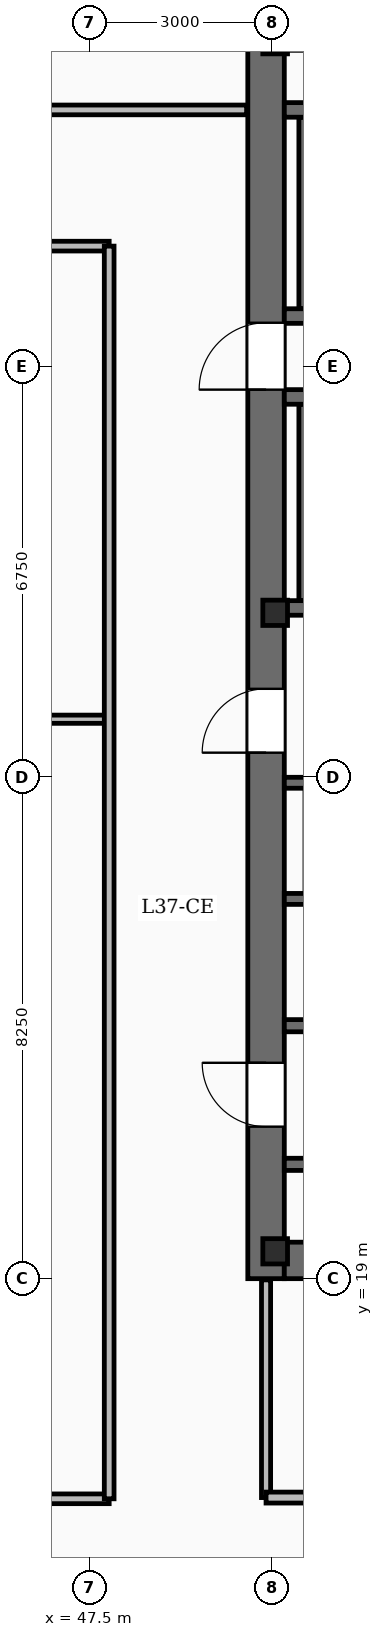
"""IFC4 building model, lengths in metres.
Left out: names, types, materials, properties, quantities, classifications, styles, units other than length and angle.
Written with IfcOpenShell. Run it as: python <this file> out.ifc"""

import sys

from ifc_helpers import new_model, si_unit, direction, frame, frame_2d, origin, origin_2d, place, context, subcontext, project, spatial, rectangle, i_section, extrude, element, fill, save


model = new_model("IFC4")
c1 = context("Model", 3, precision=1e-05, world=origin(), true_north=direction((0.0, 1.0)))
c2 = subcontext(c1, "Body", "Model", "MODEL_VIEW")
j1 = project(units=[si_unit("LENGTHUNIT", "METRE"), si_unit("PLANEANGLEUNIT", "RADIAN")], contexts=[c1])
p1 = place(None, origin())
s1 = spatial("IfcSite", under=j1, at=p1, CompositionType="ELEMENT")
p2 = place(p1, origin())
s2 = spatial("IfcBuilding", under=s1, at=p2, CompositionType="ELEMENT")
p3 = place(p2, frame((0.0, 0.0, 158.45)))
s3 = spatial("IfcBuildingStorey", under=s2, at=p3, CompositionType="ELEMENT", Elevation=158.45)
p4 = place(p3, frame((50.4, 19.0, -0.45), z_axis=(0.0, 0.0, 1.0), x_axis=(0.0, 1.0, 0.0)))
e1 = element("IfcWall", 1, at=p4, inside=s3, PredefinedType="SHEAR", context=c2, shape_type="SweptSolid", body=[
    extrude(rectangle(XDim=20.8, YDim=0.6, at=frame_2d((10.4, 0.0))), origin(), (0.0, 0.0, 1.0), 3.93),
])
p5 = place(p4, frame((2.5, 0.0, 0.45)))
e2 = element("IfcOpeningElement", 2, at=p5, cuts=e1, PredefinedType="OPENING", context=c2, shape_type="SweptSolid", body=[
    extrude(rectangle(XDim=1.05, YDim=2.15, at=frame_2d((0.525, 1.075))), frame((0.0, 0.31, 0.0), z_axis=(0.0, -1.0, 0.0), x_axis=(1.0, 0.0, 0.0)), (0.0, 0.0, 1.0), 0.62),
])
p6 = place(p4, frame((8.65, 0.0, 0.45)))
e3 = element("IfcOpeningElement", 3, at=p6, cuts=e1, PredefinedType="OPENING", context=c2, shape_type="SweptSolid", body=[
    extrude(rectangle(XDim=1.05, YDim=2.15, at=frame_2d((0.525, 1.075))), frame((0.0, 0.31, 0.0), z_axis=(0.0, -1.0, 0.0), x_axis=(1.0, 0.0, 0.0)), (0.0, 0.0, 1.0), 0.62),
])
p7 = place(p4, frame((14.62, 0.0, 0.45)))
e4 = element("IfcOpeningElement", 4, at=p7, cuts=e1, PredefinedType="OPENING", context=c2, shape_type="SweptSolid", body=[
    extrude(rectangle(XDim=1.1, YDim=2.15, at=frame_2d((0.55, 1.075))), frame((0.0, 0.31, 0.0), z_axis=(0.0, -1.0, 0.0), x_axis=(1.0, 0.0, 0.0)), (0.0, 0.0, 1.0), 0.62),
])
p8 = place(p3, frame((50.7, 19.3, -0.45), z_axis=(0.0, 0.0, 1.0), x_axis=(1.0, 0.0, 0.0)))
e5 = element("IfcWall", 5, at=p8, inside=s3, PredefinedType="SHEAR", context=c2, shape_type="SweptSolid", body=[
    extrude(rectangle(XDim=9.5, YDim=0.6, at=frame_2d((4.75, 0.0))), origin(), (0.0, 0.0, 1.0), 3.93),
])
for number, where, z_axis, x_axis in (
    (6, (50.55, 19.45, -0.45), (0.0, 0.0, 1.0), (1.0, 0.0, 0.0)),
    (7, (50.55, 29.95, -0.45), (0.0, 0.0, 1.0), (1.0, 0.0, 0.0)),
    (8, (50.55, 39.35, -0.45), (0.0, 0.0, 1.0), (1.0, 0.0, 0.0)),
):
    element("IfcColumn", number, at=place(p3, frame(where, z_axis=z_axis, x_axis=x_axis)), inside=s3, PredefinedType="COLUMN", context=c2, shape_type="SweptSolid", body=[
        extrude(i_section(OverallWidth=0.406, OverallDepth=0.416, WebThickness=0.03, FlangeThickness=0.048, FilletRadius=0.02, at=origin_2d()), origin(), (0.0, 0.0, 1.0), 3.93),
    ])
p9 = place(p3, frame((60.2, 30.03, 0.0), z_axis=(0.0, 0.0, 1.0), x_axis=(-1.0, 0.0, 0.0)))
e9 = element("IfcWall", 9, at=p9, inside=s3, PredefinedType="SOLIDWALL", context=c2, shape_type="SweptSolid", body=[
    extrude(rectangle(XDim=9.5, YDim=0.24, at=frame_2d((4.75, 0.0))), origin(), (0.0, 0.0, 1.0), 3.48),
])
p10 = place(p9, frame((7.68, 0.0, 0.0)))
e10 = element("IfcOpeningElement", 10, at=p10, cuts=e9, PredefinedType="OPENING", context=c2, shape_type="SweptSolid", body=[
    extrude(rectangle(XDim=1.1, YDim=2.15, at=frame_2d((0.55, 1.075))), frame((0.0, 0.13, 0.0), z_axis=(0.0, -1.0, 0.0), x_axis=(1.0, 0.0, 0.0)), (0.0, 0.0, 1.0), 0.26),
])
p11 = place(p3, frame((50.7, 33.5, 0.0), z_axis=(0.0, 0.0, 1.0), x_axis=(1.0, 0.0, 0.0)))
e11 = element("IfcWall", 11, at=p11, inside=s3, PredefinedType="SOLIDWALL", context=c2, shape_type="SweptSolid", body=[
    extrude(rectangle(XDim=9.5, YDim=0.24, at=frame_2d((4.75, 0.0))), origin(), (0.0, 0.0, 1.0), 3.48),
])
p12 = place(p3, frame((51.06, 30.15, 0.0), z_axis=(0.0, 0.0, 1.0), x_axis=(0.0, 1.0, 0.0)))
e12 = element("IfcWall", 12, at=p12, inside=s3, PredefinedType="SOLIDWALL", context=c2, shape_type="SweptSolid", body=[
    extrude(rectangle(XDim=3.23, YDim=0.24, at=frame_2d((1.615, 0.0))), origin(), (0.0, 0.0, 1.0), 3.48),
])
p13 = place(p3, frame((60.2, 34.83, 0.0), z_axis=(0.0, 0.0, 1.0), x_axis=(-1.0, 0.0, 0.0)))
e13 = element("IfcWall", 13, at=p13, inside=s3, PredefinedType="SOLIDWALL", context=c2, shape_type="SweptSolid", body=[
    extrude(rectangle(XDim=9.5, YDim=0.24, at=frame_2d((4.75, 0.0))), origin(), (0.0, 0.0, 1.0), 3.48),
])
p14 = place(p13, frame((7.72, 0.0, 0.0)))
e14 = element("IfcOpeningElement", 14, at=p14, cuts=e13, PredefinedType="OPENING", context=c2, shape_type="SweptSolid", body=[
    extrude(rectangle(XDim=1.1, YDim=2.15, at=frame_2d((0.55, 1.075))), frame((0.0, 0.13, 0.0), z_axis=(0.0, -1.0, 0.0), x_axis=(1.0, 0.0, 0.0)), (0.0, 0.0, 1.0), 0.26),
])
p15 = place(p3, frame((50.7, 38.22, 0.0), z_axis=(0.0, 0.0, 1.0), x_axis=(1.0, 0.0, 0.0)))
e15 = element("IfcWall", 15, at=p15, inside=s3, PredefinedType="SOLIDWALL", context=c2, shape_type="SweptSolid", body=[
    extrude(rectangle(XDim=9.5, YDim=0.24, at=frame_2d((4.75, 0.0))), origin(), (0.0, 0.0, 1.0), 3.48),
])
p16 = place(p3, frame((51.06, 34.95, 0.0), z_axis=(0.0, 0.0, 1.0), x_axis=(0.0, 1.0, 0.0)))
e16 = element("IfcWall", 16, at=p16, inside=s3, PredefinedType="SOLIDWALL", context=c2, shape_type="SweptSolid", body=[
    extrude(rectangle(XDim=3.15, YDim=0.24, at=frame_2d((1.575, 0.0))), origin(), (0.0, 0.0, 1.0), 3.48),
])
p17 = place(p3, frame((50.7, 27.155, 0.0), z_axis=(0.0, 0.0, 1.0), x_axis=(1.0, 0.0, 0.0)))
e17 = element("IfcWall", 17, at=p17, inside=s3, PredefinedType="SOLIDWALL", context=c2, shape_type="SweptSolid", body=[
    extrude(rectangle(XDim=3.165, YDim=0.18, at=frame_2d((1.583, 0.0))), origin(), (0.0, 0.0, 1.0), 3.48),
])
p18 = place(p17, frame((1.085, 0.0, 0.0)))
e18 = element("IfcOpeningElement", 18, at=p18, cuts=e17, PredefinedType="OPENING", context=c2, shape_type="SweptSolid", body=[
    extrude(rectangle(XDim=1.35, YDim=2.3, at=frame_2d((0.675, 1.15))), frame((0.0, 0.1, 0.0), z_axis=(0.0, -1.0, 0.0), x_axis=(1.0, 0.0, 0.0)), (0.0, 0.0, 1.0), 0.2),
])
p19 = place(p3, frame((50.7, 25.245, 0.0), z_axis=(0.0, 0.0, 1.0), x_axis=(1.0, 0.0, 0.0)))
e19 = element("IfcWall", 19, at=p19, inside=s3, PredefinedType="SOLIDWALL", context=c2, shape_type="SweptSolid", body=[
    extrude(rectangle(XDim=3.165, YDim=0.18, at=frame_2d((1.583, 0.0))), origin(), (0.0, 0.0, 1.0), 3.48),
])
p20 = place(p3, frame((50.7, 20.88, 0.0), z_axis=(0.0, 0.0, 1.0), x_axis=(1.0, 0.0, 0.0)))
e20 = element("IfcWall", 20, at=p20, inside=s3, PredefinedType="SOLIDWALL", context=c2, shape_type="SweptSolid", body=[
    extrude(rectangle(XDim=9.5, YDim=0.2, at=frame_2d((4.75, 0.0))), origin(), (0.0, 0.0, 1.0), 2.54),
])
p21 = place(p20, frame((1.4, 0.0, 0.0)))
e21 = element("IfcOpeningElement", 21, at=p21, cuts=e20, PredefinedType="OPENING", context=c2, shape_type="SweptSolid", body=[
    extrude(rectangle(XDim=1.05, YDim=2.15, at=frame_2d((0.525, 1.075))), frame((0.0, 0.11, 0.0), z_axis=(0.0, -1.0, 0.0), x_axis=(1.0, 0.0, 0.0)), (0.0, 0.0, 1.0), 0.22),
])
p22 = place(p20, frame((5.5, 0.0, 0.0)))
e22 = element("IfcOpeningElement", 22, at=p22, cuts=e20, PredefinedType="OPENING", context=c2, shape_type="SweptSolid", body=[
    extrude(rectangle(XDim=1.05, YDim=2.15, at=frame_2d((0.525, 1.075))), frame((0.0, 0.11, 0.0), z_axis=(0.0, -1.0, 0.0), x_axis=(1.0, 0.0, 0.0)), (0.0, 0.0, 1.0), 0.22),
])
p23 = place(p3, frame((50.7, 23.16, 0.0), z_axis=(0.0, 0.0, 1.0), x_axis=(1.0, 0.0, 0.0)))
e23 = element("IfcWall", 23, at=p23, inside=s3, PredefinedType="SOLIDWALL", context=c2, shape_type="SweptSolid", body=[
    extrude(rectangle(XDim=3.18, YDim=0.2, at=frame_2d((1.59, 0.0))), origin(), (0.0, 0.0, 1.0), 2.54),
])
p24 = place(p23, frame((0.55, 0.0, 0.0)))
e24 = element("IfcOpeningElement", 24, at=p24, cuts=e23, PredefinedType="OPENING", context=c2, shape_type="SweptSolid", body=[
    extrude(rectangle(XDim=0.86, YDim=2.05, at=frame_2d((0.43, 1.025))), frame((0.0, 0.11, 0.0), z_axis=(0.0, -1.0, 0.0), x_axis=(1.0, 0.0, 0.0)), (0.0, 0.0, 1.0), 0.22),
])
p25 = place(p3, frame((50.4, 15.4, 0.0), z_axis=(0.0, 0.0, 1.0), x_axis=(1.0, 0.0, 0.0)))
e25 = element("IfcWall", 25, at=p25, inside=s3, PredefinedType="SOLIDWALL", context=c2, shape_type="SweptSolid", body=[
    extrude(rectangle(XDim=10.0, YDim=0.18, at=frame_2d((5.0, 0.0))), origin(), (0.0, 0.0, 1.0), 2.54),
])
p26 = place(p25, frame((1.19, 0.0, 0.0)))
e26 = element("IfcOpeningElement", 26, at=p26, cuts=e25, PredefinedType="OPENING", context=c2, shape_type="SweptSolid", body=[
    extrude(rectangle(XDim=0.92, YDim=2.1, at=frame_2d((0.46, 1.05))), frame((0.0, 0.1, 0.0), z_axis=(0.0, -1.0, 0.0), x_axis=(1.0, 0.0, 0.0)), (0.0, 0.0, 1.0), 0.2),
])
p27 = place(p25, frame((4.54, 0.0, 0.0)))
e27 = element("IfcOpeningElement", 27, at=p27, cuts=e25, PredefinedType="OPENING", context=c2, shape_type="SweptSolid", body=[
    extrude(rectangle(XDim=0.92, YDim=2.1, at=frame_2d((0.46, 1.05))), frame((0.0, 0.1, 0.0), z_axis=(0.0, -1.0, 0.0), x_axis=(1.0, 0.0, 0.0)), (0.0, 0.0, 1.0), 0.2),
])
p28 = place(p25, frame((7.92, 0.0, 0.0)))
e28 = element("IfcOpeningElement", 28, at=p28, cuts=e25, PredefinedType="OPENING", context=c2, shape_type="SweptSolid", body=[
    extrude(rectangle(XDim=0.86, YDim=2.05, at=frame_2d((0.43, 1.025))), frame((0.0, 0.1, 0.0), z_axis=(0.0, -1.0, 0.0), x_axis=(1.0, 0.0, 0.0)), (0.0, 0.0, 1.0), 0.2),
])
p29 = place(p3, frame((50.4, 15.4, 0.0), z_axis=(0.0, 0.0, 1.0), x_axis=(0.0, 1.0, 0.0)))
e29 = element("IfcWall", 29, at=p29, inside=s3, PredefinedType="PARTITIONING", context=c2, shape_type="SweptSolid", body=[
    extrude(rectangle(XDim=3.58, YDim=0.15, at=frame_2d((1.79, 0.0))), origin(), (0.0, 0.0, 1.0), 2.54),
])
p30 = place(p3, frame((24.82, 38.22, 0.0), z_axis=(0.0, 0.0, 1.0), x_axis=(1.0, 0.0, 0.0)))
e30 = element("IfcWall", 30, at=p30, inside=s3, PredefinedType="PARTITIONING", context=c2, shape_type="SweptSolid", body=[
    extrude(rectangle(XDim=25.26, YDim=0.16, at=frame_2d((12.63, 0.0))), origin(), (0.0, 0.0, 1.0), 2.54),
])
p31 = place(p30, frame((3.38, 0.0, 0.0)))
e31 = element("IfcOpeningElement", 31, at=p31, cuts=e30, PredefinedType="OPENING", context=c2, shape_type="SweptSolid", body=[
    extrude(rectangle(XDim=0.95, YDim=2.15, at=frame_2d((0.475, 1.075))), frame((0.0, 0.09, 0.0), z_axis=(0.0, -1.0, 0.0), x_axis=(1.0, 0.0, 0.0)), (0.0, 0.0, 1.0), 0.18),
])
p32 = place(p30, frame((12.205, 0.0, 0.0)))
e32 = element("IfcOpeningElement", 32, at=p32, cuts=e30, PredefinedType="OPENING", context=c2, shape_type="SweptSolid", body=[
    extrude(rectangle(XDim=0.95, YDim=2.15, at=frame_2d((0.475, 1.075))), frame((0.0, 0.09, 0.0), z_axis=(0.0, -1.0, 0.0), x_axis=(1.0, 0.0, 0.0)), (0.0, 0.0, 1.0), 0.18),
])
p33 = place(p30, frame((20.98, 0.0, 0.0)))
e33 = element("IfcOpeningElement", 33, at=p33, cuts=e30, PredefinedType="OPENING", context=c2, shape_type="SweptSolid", body=[
    extrude(rectangle(XDim=0.95, YDim=2.15, at=frame_2d((0.475, 1.075))), frame((0.0, 0.09, 0.0), z_axis=(0.0, -1.0, 0.0), x_axis=(1.0, 0.0, 0.0)), (0.0, 0.0, 1.0), 0.18),
])
p34 = place(p3, frame((27.08, 28.2, 0.0), z_axis=(0.0, 0.0, 1.0), x_axis=(1.0, 0.0, 0.0)))
e34 = element("IfcWall", 34, at=p34, inside=s3, PredefinedType="PARTITIONING", context=c2, shape_type="SweptSolid", body=[
    extrude(rectangle(XDim=20.74, YDim=0.135, at=frame_2d((10.37, 0.0))), origin(), (0.0, 0.0, 1.0), 2.54),
])
p35 = place(p3, frame((27.08, 35.98, 0.0), z_axis=(0.0, 0.0, 1.0), x_axis=(1.0, 0.0, 0.0)))
e35 = element("IfcWall", 35, at=p35, inside=s3, PredefinedType="PARTITIONING", context=c2, shape_type="SweptSolid", body=[
    extrude(rectangle(XDim=20.74, YDim=0.16, at=frame_2d((10.37, 0.0))), origin(), (0.0, 0.0, 1.0), 2.54),
])
p36 = place(p35, frame((1.245, 0.0, 0.0)))
e36 = element("IfcOpeningElement", 36, at=p36, cuts=e35, PredefinedType="OPENING", context=c2, shape_type="SweptSolid", body=[
    extrude(rectangle(XDim=0.95, YDim=2.15, at=frame_2d((0.475, 1.075))), frame((0.0, 0.09, 0.0), z_axis=(0.0, -1.0, 0.0), x_axis=(1.0, 0.0, 0.0)), (0.0, 0.0, 1.0), 0.18),
])
p37 = place(p35, frame((6.445, 0.0, 0.0)))
e37 = element("IfcOpeningElement", 37, at=p37, cuts=e35, PredefinedType="OPENING", context=c2, shape_type="SweptSolid", body=[
    extrude(rectangle(XDim=0.95, YDim=2.15, at=frame_2d((0.475, 1.075))), frame((0.0, 0.09, 0.0), z_axis=(0.0, -1.0, 0.0), x_axis=(1.0, 0.0, 0.0)), (0.0, 0.0, 1.0), 0.18),
])
p38 = place(p35, frame((13.195, 0.0, 0.0)))
e38 = element("IfcOpeningElement", 38, at=p38, cuts=e35, PredefinedType="OPENING", context=c2, shape_type="SweptSolid", body=[
    extrude(rectangle(XDim=0.95, YDim=2.15, at=frame_2d((0.475, 1.075))), frame((0.0, 0.09, 0.0), z_axis=(0.0, -1.0, 0.0), x_axis=(1.0, 0.0, 0.0)), (0.0, 0.0, 1.0), 0.18),
])
p39 = place(p35, frame((18.345, 0.0, 0.0)))
e39 = element("IfcOpeningElement", 39, at=p39, cuts=e35, PredefinedType="OPENING", context=c2, shape_type="SweptSolid", body=[
    extrude(rectangle(XDim=0.95, YDim=2.15, at=frame_2d((0.475, 1.075))), frame((0.0, 0.09, 0.0), z_axis=(0.0, -1.0, 0.0), x_axis=(1.0, 0.0, 0.0)), (0.0, 0.0, 1.0), 0.18),
])
p40 = place(p3, frame((27.08, 15.38, 0.0), z_axis=(0.0, 0.0, 1.0), x_axis=(1.0, 0.0, 0.0)))
e40 = element("IfcWall", 40, at=p40, inside=s3, PredefinedType="PARTITIONING", context=c2, shape_type="SweptSolid", body=[
    extrude(rectangle(XDim=20.74, YDim=0.16, at=frame_2d((10.37, 0.0))), origin(), (0.0, 0.0, 1.0), 2.54),
])
p41 = place(p40, frame((1.245, 0.0, 0.0)))
e41 = element("IfcOpeningElement", 41, at=p41, cuts=e40, PredefinedType="OPENING", context=c2, shape_type="SweptSolid", body=[
    extrude(rectangle(XDim=0.95, YDim=2.15, at=frame_2d((0.475, 1.075))), frame((0.0, 0.09, 0.0), z_axis=(0.0, -1.0, 0.0), x_axis=(1.0, 0.0, 0.0)), (0.0, 0.0, 1.0), 0.18),
])
p42 = place(p40, frame((6.445, 0.0, 0.0)))
e42 = element("IfcOpeningElement", 42, at=p42, cuts=e40, PredefinedType="OPENING", context=c2, shape_type="SweptSolid", body=[
    extrude(rectangle(XDim=0.95, YDim=2.15, at=frame_2d((0.475, 1.075))), frame((0.0, 0.09, 0.0), z_axis=(0.0, -1.0, 0.0), x_axis=(1.0, 0.0, 0.0)), (0.0, 0.0, 1.0), 0.18),
])
p43 = place(p40, frame((13.195, 0.0, 0.0)))
e43 = element("IfcOpeningElement", 43, at=p43, cuts=e40, PredefinedType="OPENING", context=c2, shape_type="SweptSolid", body=[
    extrude(rectangle(XDim=0.95, YDim=2.15, at=frame_2d((0.475, 1.075))), frame((0.0, 0.09, 0.0), z_axis=(0.0, -1.0, 0.0), x_axis=(1.0, 0.0, 0.0)), (0.0, 0.0, 1.0), 0.18),
])
p44 = place(p40, frame((18.345, 0.0, 0.0)))
e44 = element("IfcOpeningElement", 44, at=p44, cuts=e40, PredefinedType="OPENING", context=c2, shape_type="SweptSolid", body=[
    extrude(rectangle(XDim=0.95, YDim=2.15, at=frame_2d((0.475, 1.075))), frame((0.0, 0.09, 0.0), z_axis=(0.0, -1.0, 0.0), x_axis=(1.0, 0.0, 0.0)), (0.0, 0.0, 1.0), 0.18),
])
p45 = place(p3, frame((47.82, 15.38, 0.0), z_axis=(0.0, 0.0, 1.0), x_axis=(0.0, 1.0, 0.0)))
e45 = element("IfcWall", 45, at=p45, inside=s3, PredefinedType="PARTITIONING", context=c2, shape_type="SweptSolid", body=[
    extrude(rectangle(XDim=20.6, YDim=0.16, at=frame_2d((10.3, 0.0))), origin(), (0.0, 0.0, 1.0), 2.54),
])
p46 = place(p5, origin())
e46 = element("IfcDoor", 46, at=p46, inside=s3, OperationType="SINGLE_SWING_RIGHT", PredefinedType="DOOR", context=c2, shape_type="SweptSolid", body=[
    extrude(rectangle(XDim=1.05, YDim=2.15, at=frame_2d((0.525, 1.075))), frame((0.0, 0.025, 0.0), z_axis=(0.0, -1.0, 0.0), x_axis=(1.0, 0.0, 0.0)), (0.0, 0.0, 1.0), 0.05),
])
fill(e2, e46)
p47 = place(p6, origin())
e47 = element("IfcDoor", 47, at=p47, inside=s3, OperationType="SINGLE_SWING_LEFT", PredefinedType="DOOR", context=c2, shape_type="SweptSolid", body=[
    extrude(rectangle(XDim=1.05, YDim=2.15, at=frame_2d((0.525, 1.075))), frame((0.0, 0.025, 0.0), z_axis=(0.0, -1.0, 0.0), x_axis=(1.0, 0.0, 0.0)), (0.0, 0.0, 1.0), 0.05),
])
fill(e3, e47)
p48 = place(p7, origin())
e48 = element("IfcDoor", 48, at=p48, inside=s3, OperationType="SINGLE_SWING_LEFT", PredefinedType="DOOR", context=c2, shape_type="SweptSolid", body=[
    extrude(rectangle(XDim=1.1, YDim=2.15, at=frame_2d((0.55, 1.075))), frame((0.0, 0.025, 0.0), z_axis=(0.0, -1.0, 0.0), x_axis=(1.0, 0.0, 0.0)), (0.0, 0.0, 1.0), 0.05),
])
fill(e4, e48)
save(model, sys.argv[1])
